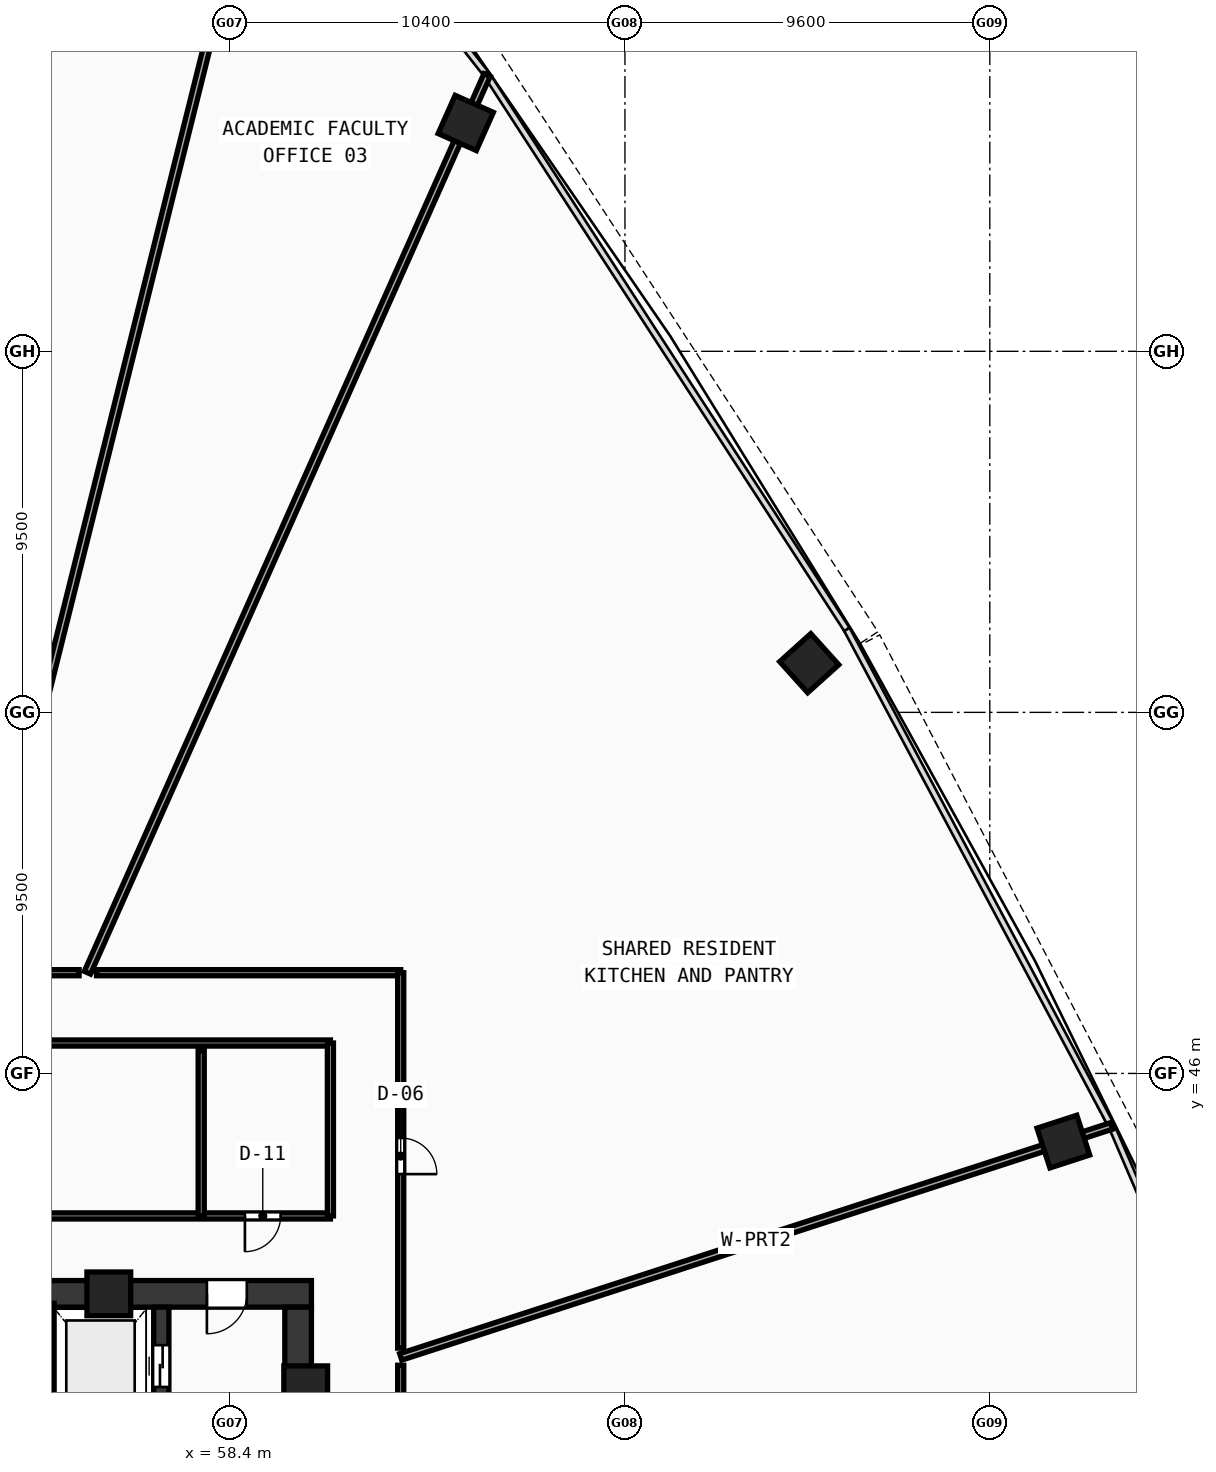
"""IFC4 building model, lengths in metres.
Left out: names, types, materials, properties, quantities, classifications, styles, units other than length and angle.
Written with IfcOpenShell. Run it as: python <this file> out.ifc"""

import sys

from ifc_helpers import new_model, si_unit, direction, frame, frame_2d, origin, origin_with_axes, origin_2d, place, context, subcontext, project, spatial, rectangle, hollow_rectangle, extrude, source, transform, mapped, element, fill, save


model = new_model("IFC4")
c1 = context("Model", 3, precision=1e-05, world=origin(), true_north=direction((0.0, 1.0)))
c2 = subcontext(c1, "Body", "Model", "MODEL_VIEW")
j1 = project(units=[si_unit("LENGTHUNIT", "METRE"), si_unit("PLANEANGLEUNIT", "RADIAN")], contexts=[c1])
p1 = place(None, origin())
s1 = spatial("IfcSite", under=j1, at=p1, CompositionType="ELEMENT")
p2 = place(p1, origin())
s2 = spatial("IfcBuilding", under=s1, at=p2, CompositionType="ELEMENT")
p3 = place(p2, frame((0.0, 0.0, 55.81)))
s3 = spatial("IfcBuildingStorey", under=s2, at=p3, CompositionType="ELEMENT", Elevation=55.81)
p4 = place(p3, frame((49.2, 40.2, 0.0), z_axis=(0.0, 0.0, 1.0), x_axis=(1.0, 0.0, 0.0)))
e1 = element("IfcWall", 1, at=p4, inside=s3, PredefinedType="SHEAR", context=c2, shape_type="SweptSolid", body=[
    extrude(rectangle(XDim=11.35, YDim=0.7, at=frame_2d((5.675, 0.0))), origin(), (0.0, 0.0, 1.0), 3.37),
])
p5 = place(p4, frame((8.6, 0.0, 0.0)))
e2 = element("IfcOpeningElement", 2, at=p5, cuts=e1, PredefinedType="OPENING", context=c2, shape_type="SweptSolid", body=[
    extrude(rectangle(XDim=1.05, YDim=2.1, at=frame_2d((0.525, 1.05))), frame((0.0, 0.36, 0.0), z_axis=(0.0, -1.0, 0.0), x_axis=(1.0, 0.0, 0.0)), (0.0, 0.0, 1.0), 0.72),
])
p6 = place(p3, frame((60.2, 27.85, 0.0), z_axis=(0.0, 0.0, 1.0), x_axis=(0.0, 1.0, 0.0)))
e3 = element("IfcWall", 3, at=p6, inside=s3, PredefinedType="SHEAR", context=c2, shape_type="SweptSolid", body=[
    extrude(rectangle(XDim=12.0, YDim=0.7, at=frame_2d((6.0, 0.0))), origin(), (0.0, 0.0, 1.0), 3.37),
])
p7 = place(p3, frame((56.6, 27.85, 0.0), z_axis=(0.0, 0.0, 1.0), x_axis=(0.0, 1.0, 0.0)))
e4 = element("IfcWall", 4, at=p7, inside=s3, PredefinedType="SHEAR", context=c2, shape_type="SweptSolid", body=[
    extrude(rectangle(XDim=12.0, YDim=0.4, at=frame_2d((6.0, 0.0))), origin(), (0.0, 0.0, 1.0), 3.37),
])
p8 = place(p7, frame((9.9, 0.0, 0.0)))
e5 = element("IfcOpeningElement", 5, at=p8, cuts=e4, PredefinedType="OPENING", context=c2, shape_type="SweptSolid", body=[
    extrude(rectangle(XDim=1.1, YDim=2.1, at=frame_2d((0.55, 1.05))), frame((0.0, 0.21, 0.0), z_axis=(0.0, -1.0, 0.0), x_axis=(1.0, 0.0, 0.0)), (0.0, 0.0, 1.0), 0.42),
])
m1 = source(origin(), c2, "Body", "SweptSolid", [
    extrude(hollow_rectangle(XDim=1.15, YDim=1.15, WallThickness=0.048, at=origin_2d()), origin(), (0.0, 0.0, 1.0), 3.63),
])
for number, where, z_axis, x_axis in (
    (6, (60.4, 37.729, -0.26), (0.0, 0.0, 1.0), (1.0, 0.0, 0.0)),
    (7, (55.219, 40.2, -0.26), (0.0, 0.0, 1.0), (1.0, 0.0, 0.0)),
):
    element("IfcColumn", number, at=place(p3, frame(where, z_axis=z_axis, x_axis=x_axis)), inside=s3, PredefinedType="COLUMN", context=c2, shape_type="MappedRepresentation", body=[
        mapped(m1, transform((0.0, 0.0, 0.0), scale=1.0)),
    ])
m2 = source(origin(), c2, "Body", "SweptSolid", [
    extrude(hollow_rectangle(XDim=1.1, YDim=1.1, WallThickness=0.045, at=origin_2d()), origin(), (0.0, 0.0, 1.0), 3.63),
])
for number, where, z_axis, x_axis in (
    (8, (80.335, 44.206, -0.26), (0.0, 0.0, 1.0), (-0.309, 0.951, 0.0)),
    (9, (73.649, 56.794, -0.26), (0.0, 0.0, 1.0), (-0.669, 0.743, 0.0)),
    (10, (64.611, 71.009, -0.26), (0.0, 0.0, 1.0), (-0.914, 0.407, 0.0)),
):
    element("IfcColumn", number, at=place(p3, frame(where, z_axis=z_axis, x_axis=x_axis)), inside=s3, PredefinedType="COLUMN", context=c2, shape_type="MappedRepresentation", body=[
        mapped(m2, transform((0.0, 0.0, 0.0), scale=1.0)),
    ])
p9 = place(p3, frame((53.68, 36.65, 0.0), z_axis=(0.0, 0.0, 1.0), x_axis=(0.0, 1.0, 0.0)))
e11 = element("IfcWall", 11, at=p9, inside=s3, PredefinedType="SOLIDWALL", context=c2, shape_type="SweptSolid", body=[
    extrude(rectangle(XDim=3.3, YDim=0.2, at=frame_2d((1.65, 0.0))), origin(), (0.0, 0.0, 1.0), 3.37),
])
p10 = place(p3, frame((45.92, 42.25, 0.0), z_axis=(0.0, 0.0, 1.0), x_axis=(1.0, 0.0, 0.0)))
e12 = element("IfcWall", 12, at=p10, inside=s3, PredefinedType="PARTITIONING", context=c2, shape_type="SweptSolid", body=[
    extrude(rectangle(XDim=15.13, YDim=0.16, at=frame_2d((7.565, 0.0))), origin(), (0.0, 0.0, 1.0), 2.67),
])
p11 = place(p10, frame((2.1, 0.0, 0.0)))
e13 = element("IfcOpeningElement", 13, at=p11, cuts=e12, PredefinedType="OPENING", context=c2, shape_type="SweptSolid", body=[
    extrude(rectangle(XDim=0.92, YDim=2.1, at=frame_2d((0.46, 1.05))), frame((0.0, 0.09, 0.0), z_axis=(0.0, -1.0, 0.0), x_axis=(1.0, 0.0, 0.0)), (0.0, 0.0, 1.0), 0.18),
])
p12 = place(p10, frame((12.88, 0.0, 0.0)))
e14 = element("IfcOpeningElement", 14, at=p12, cuts=e12, PredefinedType="OPENING", context=c2, shape_type="SweptSolid", body=[
    extrude(rectangle(XDim=0.94, YDim=2.1, at=frame_2d((0.47, 1.05))), frame((0.0, 0.09, 0.0), z_axis=(0.0, -1.0, 0.0), x_axis=(1.0, 0.0, 0.0)), (0.0, 0.0, 1.0), 0.18),
])
p13 = place(p3, frame((45.92, 46.8, 0.0), z_axis=(0.0, 0.0, 1.0), x_axis=(1.0, 0.0, 0.0)))
e15 = element("IfcWall", 15, at=p13, inside=s3, PredefinedType="PARTITIONING", context=c2, shape_type="SweptSolid", body=[
    extrude(rectangle(XDim=15.13, YDim=0.16, at=frame_2d((7.565, 0.0))), origin(), (0.0, 0.0, 1.0), 2.67),
])
p14 = place(p3, frame((61.05, 42.25, 0.0), z_axis=(0.0, 0.0, 1.0), x_axis=(0.0, 1.0, 0.0)))
e16 = element("IfcWall", 16, at=p14, inside=s3, PredefinedType="PARTITIONING", context=c2, shape_type="SweptSolid", body=[
    extrude(rectangle(XDim=4.55, YDim=0.16, at=frame_2d((2.275, 0.0))), origin(), (0.0, 0.0, 1.0), 2.67),
])
p15 = place(p3, frame((57.65, 42.25, 0.0), z_axis=(0.0, 0.0, 1.0), x_axis=(0.0, 1.0, 0.0)))
e17 = element("IfcWall", 17, at=p15, inside=s3, PredefinedType="PARTITIONING", context=c2, shape_type="SweptSolid", body=[
    extrude(rectangle(XDim=4.35, YDim=0.16, at=frame_2d((2.175, 0.0))), origin(), (0.0, 0.0, 1.0), 2.67),
])
p16 = place(p3, frame((62.9, 38.541, 0.0), z_axis=(0.0, 0.0, 1.0), x_axis=(0.951053317048, 0.309026840471, 0.0)))
e18 = element("IfcWall", 18, at=p16, inside=s3, PredefinedType="PARTITIONING", context=c2, shape_type="SweptSolid", body=[
    extrude(rectangle(XDim=19.666, YDim=0.18, at=frame_2d((9.833, 0.0))), origin(), (0.0, 0.0, 1.0), 2.67),
])
p17 = place(p3, frame((54.656, 48.65, 0.0), z_axis=(0.0, 0.0, 1.0), x_axis=(0.406729800422, 0.913548504158, 0.0)))
e19 = element("IfcWall", 19, at=p17, inside=s3, PredefinedType="PARTITIONING", context=c2, shape_type="SweptSolid", body=[
    extrude(rectangle(XDim=25.854, YDim=0.18, at=frame_2d((12.927, 0.0))), origin(), (0.0, 0.0, 1.0), 2.67),
])
p18 = place(p3, frame((51.728, 48.65, 0.0), z_axis=(0.0, 0.0, 1.0), x_axis=(0.241918895985, 0.970296474159, 0.0)))
e20 = element("IfcWall", 20, at=p18, inside=s3, PredefinedType="PARTITIONING", context=c2, shape_type="SweptSolid", body=[
    extrude(rectangle(XDim=31.858, YDim=0.18, at=frame_2d((15.929, 0.0))), origin(), (0.0, 0.0, 1.0), 2.67),
])
p19 = place(p3, frame((51.954, 48.65, 0.0), z_axis=(0.0, 0.0, 1.0), x_axis=(1.0, 0.0, 0.0)))
e21 = element("IfcWall", 21, at=p19, inside=s3, PredefinedType="PARTITIONING", context=c2, shape_type="SweptSolid", body=[
    extrude(rectangle(XDim=2.482, YDim=0.16, at=frame_2d((1.241, 0.0))), origin(), (0.0, 0.0, 1.0), 2.67),
])
p20 = place(p19, frame((0.778, 0.0, 0.0)))
e22 = element("IfcOpeningElement", 22, at=p20, cuts=e21, PredefinedType="OPENING", context=c2, shape_type="SweptSolid", body=[
    extrude(rectangle(XDim=0.92, YDim=2.1, at=frame_2d((0.46, 1.05))), frame((0.0, 0.09, 0.0), z_axis=(0.0, -1.0, 0.0), x_axis=(1.0, 0.0, 0.0)), (0.0, 0.0, 1.0), 0.18),
])
p21 = place(p3, frame((54.897, 48.65, 0.0), z_axis=(0.0, 0.0, 1.0), x_axis=(1.0, 0.0, 0.0)))
e23 = element("IfcWall", 23, at=p21, inside=s3, PredefinedType="PARTITIONING", context=c2, shape_type="SweptSolid", body=[
    extrude(rectangle(XDim=8.003, YDim=0.16, at=frame_2d((4.001, 0.0))), origin(), (0.0, 0.0, 1.0), 2.97),
])
p22 = place(p3, frame((62.9, 48.65, 0.0), z_axis=(0.0, 0.0, 1.0), x_axis=(0.0, -1.0, 0.0)))
e24 = element("IfcWall", 24, at=p22, inside=s3, PredefinedType="PARTITIONING", context=c2, shape_type="SweptSolid", body=[
    extrude(rectangle(XDim=9.877, YDim=0.16, at=frame_2d((4.938, 0.0))), origin(), (0.0, 0.0, 1.0), 2.67),
])
p23 = place(p22, frame((4.349, 0.0, 0.0)))
e25 = element("IfcOpeningElement", 25, at=p23, cuts=e24, PredefinedType="OPENING", context=c2, shape_type="SweptSolid", body=[
    extrude(rectangle(XDim=0.95, YDim=2.1, at=frame_2d((0.475, 1.05))), frame((0.0, 0.09, 0.0), z_axis=(0.0, -1.0, 0.0), x_axis=(1.0, 0.0, 0.0)), (0.0, 0.0, 1.0), 0.18),
])
p24 = place(p3, frame((62.9, 38.322, 0.0), z_axis=(0.0, 0.0, 1.0), x_axis=(0.0, -1.0, 0.0)))
e26 = element("IfcWall", 26, at=p24, inside=s3, PredefinedType="PARTITIONING", context=c2, shape_type="SweptSolid", body=[
    extrude(rectangle(XDim=7.029, YDim=0.16, at=frame_2d((3.515, 0.0))), origin(), (0.0, 0.0, 1.0), 3.37),
])
p25 = place(p24, frame((3.054, 0.0, 0.0)))
e27 = element("IfcOpeningElement", 27, at=p25, cuts=e26, PredefinedType="OPENING", context=c2, shape_type="SweptSolid", body=[
    extrude(rectangle(XDim=0.92, YDim=2.1, at=frame_2d((0.46, 1.05))), frame((0.0, 0.09, 0.0), z_axis=(0.0, -1.0, 0.0), x_axis=(1.0, 0.0, 0.0)), (0.0, 0.0, 1.0), 0.18),
])
m3 = source(origin(), c2, "Body", "SweptSolid", [
    extrude(rectangle(XDim=1.05, YDim=2.1, at=frame_2d((0.525, 1.05))), frame((0.0, 0.025, 0.0), z_axis=(0.0, -1.0, 0.0), x_axis=(1.0, 0.0, 0.0)), (0.0, 0.0, 1.0), 0.05),
])
p26 = place(p5, frame((1.05, 0.0, 0.0), z_axis=(0.0, 0.0, 1.0), x_axis=(-1.0, 0.0, 0.0)))
e28 = element("IfcDoor", 28, at=p26, inside=s3, OperationType="SINGLE_SWING_RIGHT", PredefinedType="DOOR", context=c2, shape_type="MappedRepresentation", body=[
    mapped(m3, transform((0.0, 0.0, 0.0), scale=1.0)),
])
fill(e2, e28)
m4 = source(origin(), c2, "Body", "SweptSolid", [
    extrude(rectangle(XDim=1.1, YDim=2.1, at=frame_2d((0.55, 1.05))), frame((0.0, 0.025, 0.0), z_axis=(0.0, -1.0, 0.0), x_axis=(1.0, 0.0, 0.0)), (0.0, 0.0, 1.0), 0.05),
])
p27 = place(p8, origin_with_axes())
e29 = element("IfcDoor", 29, at=p27, inside=s3, OperationType="DOUBLE_DOOR_SLIDING", PredefinedType="DOOR", context=c2, shape_type="MappedRepresentation", body=[
    mapped(m4, transform((0.0, 0.0, 0.0), scale=1.0)),
])
fill(e5, e29)
m5 = source(origin(), c2, "Body", "SweptSolid", [
    extrude(rectangle(XDim=0.94, YDim=2.1, at=frame_2d((0.47, 1.05))), frame((0.0, 0.025, 0.0), z_axis=(0.0, -1.0, 0.0), x_axis=(1.0, 0.0, 0.0)), (0.0, 0.0, 1.0), 0.05),
])
p28 = place(p12, frame((0.94, 0.0, 0.0), z_axis=(0.0, 0.0, 1.0), x_axis=(-1.0, 0.0, 0.0)))
e30 = element("IfcDoor", 30, at=p28, inside=s3, OperationType="SINGLE_SWING_RIGHT", PredefinedType="DOOR", context=c2, shape_type="MappedRepresentation", body=[
    mapped(m5, transform((0.0, 0.0, 0.0), scale=1.0)),
])
fill(e14, e30)
m6 = source(origin(), c2, "Body", "SweptSolid", [
    extrude(rectangle(XDim=0.95, YDim=2.1, at=frame_2d((0.475, 1.05))), frame((0.0, 0.025, 0.0), z_axis=(0.0, -1.0, 0.0), x_axis=(1.0, 0.0, 0.0)), (0.0, 0.0, 1.0), 0.05),
])
p29 = place(p23, origin_with_axes())
e31 = element("IfcDoor", 31, at=p29, inside=s3, OperationType="SINGLE_SWING_RIGHT", PredefinedType="DOOR", context=c2, shape_type="MappedRepresentation", body=[
    mapped(m6, transform((0.0, 0.0, 0.0), scale=1.0)),
])
fill(e25, e31)
save(model, sys.argv[1])
